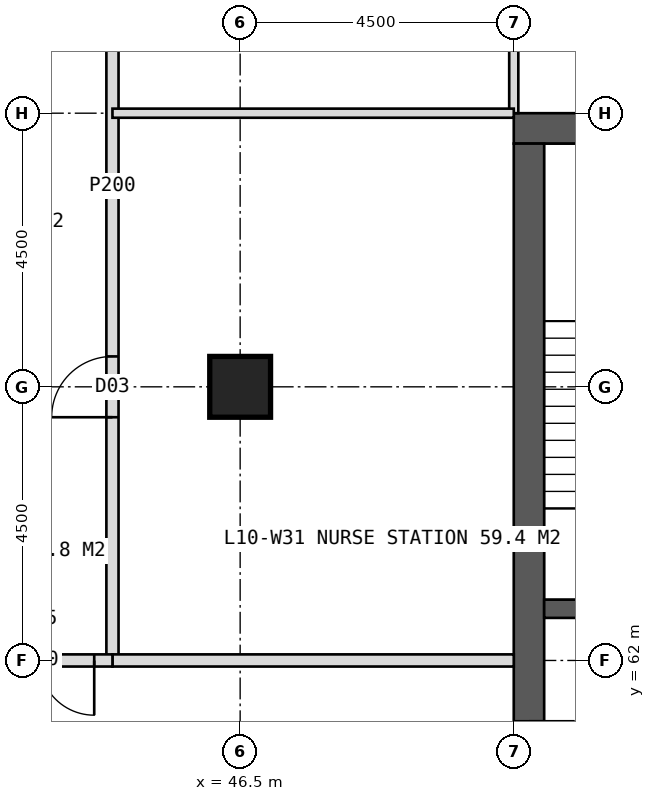
"""IFC4 building model, lengths in metres.
Left out: names, types, materials, properties, quantities, classifications, styles, units other than length and angle.
Written with IfcOpenShell. Run it as: python <this file> out.ifc"""

import sys

from ifc_helpers import new_model, si_unit, direction, frame, frame_2d, origin, origin_2d, place, context, subcontext, project, spatial, rectangle, hollow_rectangle, extrude, element, fill, save


model = new_model("IFC4")
c1 = context("Model", 3, precision=1e-05, world=origin(), true_north=direction((0.0, 1.0)))
c2 = subcontext(c1, "Body", "Model", "MODEL_VIEW")
j1 = project(units=[si_unit("LENGTHUNIT", "METRE"), si_unit("PLANEANGLEUNIT", "RADIAN")], contexts=[c1])
p1 = place(None, origin())
s1 = spatial("IfcSite", under=j1, at=p1, CompositionType="ELEMENT")
p2 = place(p1, origin())
s2 = spatial("IfcBuilding", under=s1, at=p2, CompositionType="ELEMENT")
p3 = place(p2, frame((0.0, 0.0, 47.0)))
s3 = spatial("IfcBuildingStorey", under=s2, at=p3, CompositionType="ELEMENT", Elevation=47.0)
p4 = place(p3, frame((51.0, 70.75, 0.0), z_axis=(0.0, 0.0, 1.0), x_axis=(1.0, 0.0, 0.0)))
e1 = element("IfcWall", 1, at=p4, inside=s3, PredefinedType="SHEAR", context=c2, shape_type="SweptSolid", body=[
    extrude(rectangle(XDim=18.0, YDim=0.5, at=frame_2d((9.0, 0.0))), origin(), (0.0, 0.0, 1.0), 4.0),
])
p5 = place(p4, frame((8.1, 0.0, 0.0)))
e2 = element("IfcOpeningElement", 2, at=p5, cuts=e1, PredefinedType="OPENING", context=c2, shape_type="SweptSolid", body=[
    extrude(rectangle(XDim=1.8, YDim=2.2, at=frame_2d((0.9, 1.1))), frame((0.0, 0.26, 0.0), z_axis=(0.0, -1.0, 0.0), x_axis=(1.0, 0.0, 0.0)), (0.0, 0.0, 1.0), 0.52),
])
p6 = place(p3, frame((51.25, 53.5, 0.0), z_axis=(0.0, 0.0, 1.0), x_axis=(0.0, 1.0, 0.0)))
e3 = element("IfcWall", 3, at=p6, inside=s3, PredefinedType="SHEAR", context=c2, shape_type="SweptSolid", body=[
    extrude(rectangle(XDim=17.0, YDim=0.5, at=frame_2d((8.5, 0.0))), origin(), (0.0, 0.0, 1.0), 4.0),
])
p7 = place(p6, frame((6.0, 0.0, 0.0)))
e4 = element("IfcOpeningElement", 4, at=p7, cuts=e3, PredefinedType="OPENING", context=c2, shape_type="SweptSolid", body=[
    extrude(rectangle(XDim=1.5, YDim=2.2, at=frame_2d((0.75, 1.1))), frame((0.0, 0.26, 0.0), z_axis=(0.0, -1.0, 0.0), x_axis=(1.0, 0.0, 0.0)), (0.0, 0.0, 1.0), 0.52),
])
p8 = place(p3, frame((51.5, 62.85, 0.0), z_axis=(0.0, 0.0, 1.0), x_axis=(1.0, 0.0, 0.0)))
e5 = element("IfcWall", 5, at=p8, inside=s3, PredefinedType="SHEAR", context=c2, shape_type="SweptSolid", body=[
    extrude(rectangle(XDim=3.3, YDim=0.3, at=frame_2d((1.65, 0.0))), origin(), (0.0, 0.0, 1.0), 4.0),
])
p9 = place(p8, frame((1.05, 0.0, 0.0)))
e6 = element("IfcOpeningElement", 6, at=p9, cuts=e5, PredefinedType="OPENING", context=c2, shape_type="SweptSolid", body=[
    extrude(rectangle(XDim=1.2, YDim=2.1, at=frame_2d((0.6, 1.05))), frame((0.0, 0.16, 0.0), z_axis=(0.0, -1.0, 0.0), x_axis=(1.0, 0.0, 0.0)), (0.0, 0.0, 1.0), 0.32),
])
p10 = place(p3, frame((46.5, 66.5, 0.0), z_axis=(0.0, 0.0, 1.0), x_axis=(1.0, 0.0, 0.0)))
e7 = element("IfcColumn", 7, at=p10, inside=s3, PredefinedType="COLUMN", context=c2, shape_type="SweptSolid", body=[
    extrude(hollow_rectangle(XDim=1.0, YDim=1.0, WallThickness=0.1, at=origin_2d()), origin(), (0.0, 0.0, 1.0), 4.0),
])
p11 = place(p3, frame((51.0, 71.0, 0.0), z_axis=(0.0, 0.0, 1.0), x_axis=(0.0, 1.0, 0.0)))
e8 = element("IfcWall", 8, at=p11, inside=s3, PredefinedType="PARTITIONING", context=c2, shape_type="SweptSolid", body=[
    extrude(rectangle(XDim=6.6, YDim=0.15, at=frame_2d((3.3, 0.0))), origin(), (0.0, 0.0, 1.0), 3.75),
])
p12 = place(p3, frame((44.4, 62.0, 0.0), z_axis=(0.0, 0.0, 1.0), x_axis=(0.0, 1.0, 0.0)))
e9 = element("IfcWall", 9, at=p12, inside=s3, PredefinedType="PARTITIONING", context=c2, shape_type="SweptSolid", body=[
    extrude(rectangle(XDim=15.6, YDim=0.2, at=frame_2d((7.8, 0.0))), origin(), (0.0, 0.0, 1.0), 3.75),
])
p13 = place(p12, frame((4.0, 0.0, 0.0)))
e10 = element("IfcOpeningElement", 10, at=p13, cuts=e9, PredefinedType="OPENING", context=c2, shape_type="SweptSolid", body=[
    extrude(rectangle(XDim=1.0, YDim=2.1, at=frame_2d((0.5, 1.05))), frame((0.0, 0.11, 0.0), z_axis=(0.0, -1.0, 0.0), x_axis=(1.0, 0.0, 0.0)), (0.0, 0.0, 1.0), 0.22),
])
p14 = place(p12, frame((11.8, 0.0, 0.0)))
e11 = element("IfcOpeningElement", 11, at=p14, cuts=e9, PredefinedType="OPENING", context=c2, shape_type="SweptSolid", body=[
    extrude(rectangle(XDim=1.0, YDim=2.1, at=frame_2d((0.5, 1.05))), frame((0.0, 0.11, 0.0), z_axis=(0.0, -1.0, 0.0), x_axis=(1.0, 0.0, 0.0)), (0.0, 0.0, 1.0), 0.22),
])
p15 = place(p3, frame((51.0, 62.0, 0.0), z_axis=(0.0, 0.0, 1.0), x_axis=(-1.0, 0.0, 0.0)))
e12 = element("IfcWall", 12, at=p15, inside=s3, PredefinedType="SOLIDWALL", context=c2, shape_type="SweptSolid", body=[
    extrude(rectangle(XDim=6.6, YDim=0.2, at=frame_2d((3.3, 0.0))), origin(), (0.0, 0.0, 1.0), 2.75),
])
p16 = place(p3, frame((51.0, 71.0, 0.0), z_axis=(0.0, 0.0, 1.0), x_axis=(-1.0, 0.0, 0.0)))
e13 = element("IfcWall", 13, at=p16, inside=s3, PredefinedType="PARTITIONING", context=c2, shape_type="SweptSolid", body=[
    extrude(rectangle(XDim=6.6, YDim=0.15, at=frame_2d((3.3, 0.0))), origin(), (0.0, 0.0, 1.0), 3.75),
])
p17 = place(p3, frame((44.4, 62.0, 0.0), z_axis=(0.0, 0.0, 1.0), x_axis=(-1.0, 0.0, 0.0)))
e14 = element("IfcWall", 14, at=p17, inside=s3, PredefinedType="SOLIDWALL", context=c2, shape_type="SweptSolid", body=[
    extrude(rectangle(XDim=2.7, YDim=0.2, at=frame_2d((1.35, 0.0))), origin(), (0.0, 0.0, 1.0), 2.75),
])
p18 = place(p17, frame((0.3, 0.0, 0.0)))
e15 = element("IfcOpeningElement", 15, at=p18, cuts=e14, PredefinedType="OPENING", context=c2, shape_type="SweptSolid", body=[
    extrude(rectangle(XDim=1.8, YDim=2.2, at=frame_2d((0.9, 1.1))), frame((0.0, 0.11, 0.0), z_axis=(0.0, -1.0, 0.0), x_axis=(1.0, 0.0, 0.0)), (0.0, 0.0, 1.0), 0.22),
])
p19 = place(p13, origin())
e16 = element("IfcDoor", 16, at=p19, inside=s3, OperationType="SINGLE_SWING_LEFT", PredefinedType="DOOR", context=c2, shape_type="SweptSolid", body=[
    extrude(rectangle(XDim=1.0, YDim=2.1, at=frame_2d((0.5, 1.05))), frame((0.0, 0.025, 0.0), z_axis=(0.0, -1.0, 0.0), x_axis=(1.0, 0.0, 0.0)), (0.0, 0.0, 1.0), 0.05),
])
fill(e10, e16)
p20 = place(p18, origin())
e17 = element("IfcDoor", 17, at=p20, inside=s3, OperationType="DOUBLE_DOOR_DOUBLE_SWING", PredefinedType="DOOR", context=c2, shape_type="SweptSolid", body=[
    extrude(rectangle(XDim=1.8, YDim=2.2, at=frame_2d((0.9, 1.1))), frame((0.0, 0.025, 0.0), z_axis=(0.0, -1.0, 0.0), x_axis=(1.0, 0.0, 0.0)), (0.0, 0.0, 1.0), 0.05),
])
fill(e15, e17)
save(model, sys.argv[1])
